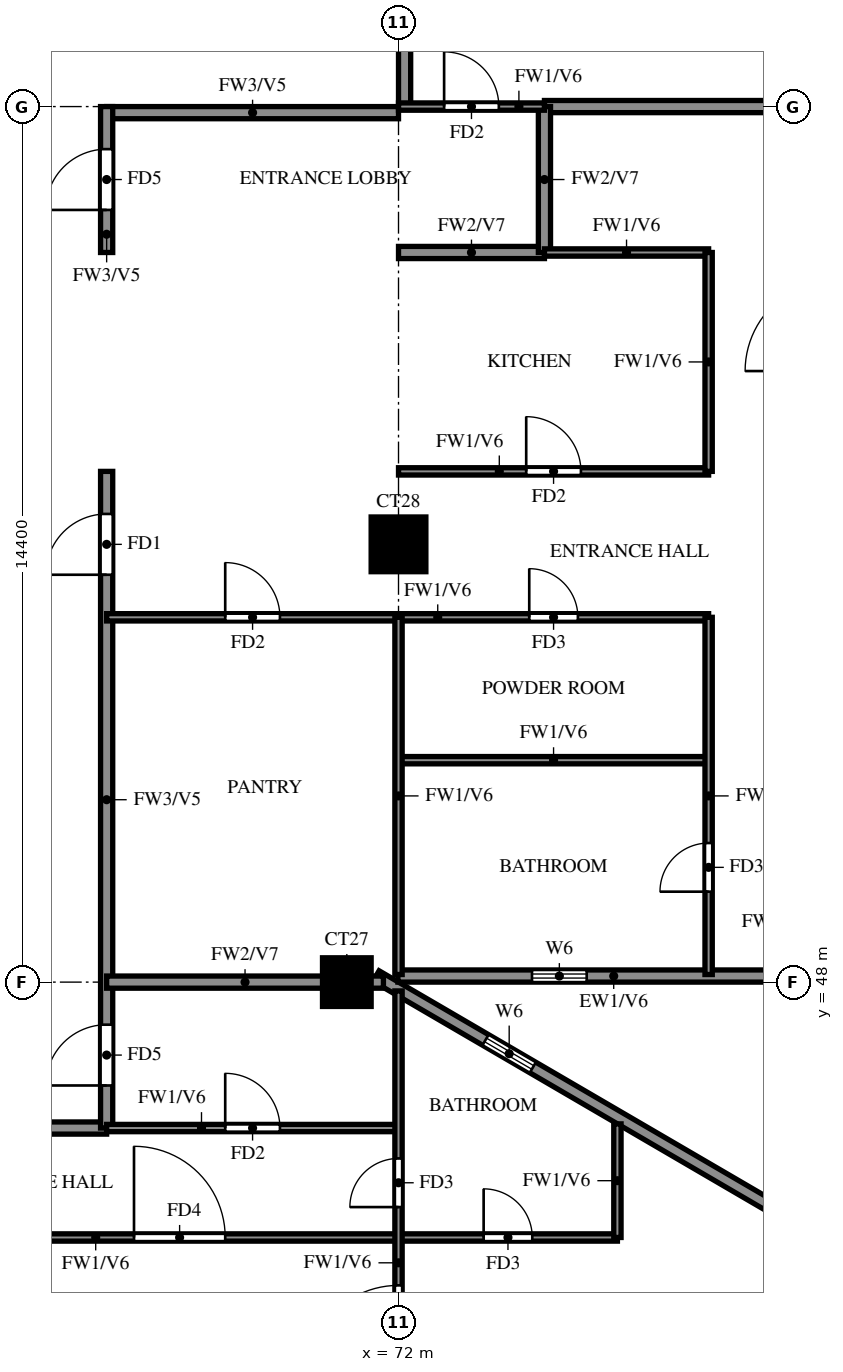
"""IFC4 building model, lengths in metres.
Left out: names, types, materials, properties, quantities, classifications, styles, units other than length and angle.
Written with IfcOpenShell. Run it as: python <this file> out.ifc"""

import sys

from ifc_helpers import new_model, si_unit, direction, frame, frame_2d, origin, origin_2d, place, context, subcontext, project, spatial, rectangle, extrude, source, transform, mapped, element, fill, save


model = new_model("IFC4")
c1 = context("Model", 3, precision=1e-05, world=origin(), true_north=direction((0.0, 1.0)))
c2 = subcontext(c1, "Body", "Model", "MODEL_VIEW")
j1 = project(units=[si_unit("LENGTHUNIT", "METRE"), si_unit("PLANEANGLEUNIT", "RADIAN")], contexts=[c1])
p1 = place(None, origin())
s1 = spatial("IfcSite", under=j1, at=p1, CompositionType="ELEMENT")
p2 = place(p1, origin())
s2 = spatial("IfcBuilding", under=s1, at=p2, CompositionType="ELEMENT")
p3 = place(p2, frame((0.0, 0.0, 202.5)))
s3 = spatial("IfcBuildingStorey", under=s2, at=p3, CompositionType="ELEMENT", Elevation=202.5)
m1 = source(origin(), c2, "Body", "SweptSolid", [
    extrude(rectangle(XDim=0.8, YDim=0.8, at=origin_2d()), origin(), (0.0, 0.0, 1.0), 3.1),
])
p4 = place(p3, frame((71.15, 48.0, 0.0), z_axis=(0.0, 0.0, 1.0), x_axis=(1.0, 0.0, 0.0)))
e1 = element("IfcColumn", 1, at=p4, inside=s3, PredefinedType="COLUMN", context=c2, shape_type="MappedRepresentation", body=[
    mapped(m1, transform((0.0, 0.0, 0.0))),
])
m2 = source(origin(), c2, "Body", "SweptSolid", [
    extrude(rectangle(XDim=0.9, YDim=0.9, at=origin_2d()), origin(), (0.0, 0.0, 1.0), 3.1),
])
p5 = place(p3, frame((72.0, 55.2, 0.0), z_axis=(0.0, 0.0, 1.0), x_axis=(1.0, 0.0, 0.0)))
e2 = element("IfcColumn", 2, at=p5, inside=s3, PredefinedType="COLUMN", context=c2, shape_type="MappedRepresentation", body=[
    mapped(m2, transform((0.0, 0.0, 0.0))),
])
p6 = place(p3, frame((85.719, 39.881, 0.0), z_axis=(0.0, 0.0, 1.0), x_axis=(-0.86377618652, 0.503875678716, 0.0)))
e3 = element("IfcWall", 3, at=p6, inside=s3, PredefinedType="SOLIDWALL", context=c2, shape_type="SweptSolid", body=[
    extrude(rectangle(XDim=16.311, YDim=0.2, at=frame_2d((8.156, 0.0))), origin(), (0.0, 0.0, 1.0), 3.1),
])
p7 = place(p6, frame((13.326, 0.0, 1.5)))
e4 = element("IfcOpeningElement", 4, at=p7, cuts=e3, PredefinedType="OPENING", context=c2, shape_type="SweptSolid", body=[
    extrude(rectangle(XDim=0.9, YDim=0.9, at=frame_2d((0.45, 0.45))), frame((0.0, 0.11, 0.0), z_axis=(0.0, -1.0, 0.0), x_axis=(1.0, 0.0, 0.0)), (0.0, 0.0, 1.0), 0.22),
])
p8 = place(p3, frame((71.99, 48.1, 0.0), z_axis=(0.0, 0.0, 1.0), x_axis=(1.0, 0.0, 0.0)))
e5 = element("IfcWall", 5, at=p8, inside=s3, PredefinedType="SOLIDWALL", context=c2, shape_type="SweptSolid", body=[
    extrude(rectangle(XDim=6.76, YDim=0.2, at=frame_2d((3.38, 0.0))), origin(), (0.0, 0.0, 1.0), 3.1),
])
p9 = place(p8, frame((2.205, 0.0, 1.5)))
e6 = element("IfcOpeningElement", 6, at=p9, cuts=e5, PredefinedType="OPENING", context=c2, shape_type="SweptSolid", body=[
    extrude(rectangle(XDim=0.9, YDim=0.9, at=frame_2d((0.45, 0.45))), frame((0.0, 0.11, 0.0), z_axis=(0.0, -1.0, 0.0), x_axis=(1.0, 0.0, 0.0)), (0.0, 0.0, 1.0), 0.22),
])
p10 = place(p3, frame((60.0, 45.6, 0.0), z_axis=(0.0, 0.0, 1.0), x_axis=(1.0, 0.0, 0.0)))
e7 = element("IfcWall", 7, at=p10, inside=s3, PredefinedType="SOLIDWALL", context=c2, shape_type="SweptSolid", body=[
    extrude(rectangle(XDim=7.2, YDim=0.2, at=frame_2d((3.6, 0.0))), origin(), (0.0, 0.0, 1.0), 3.1),
])
p11 = place(p3, frame((67.2, 62.3, 0.0), z_axis=(0.0, 0.0, 1.0), x_axis=(1.0, 0.0, 0.0)))
e8 = element("IfcWall", 8, at=p11, inside=s3, PredefinedType="SOLIDWALL", context=c2, shape_type="SweptSolid", body=[
    extrude(rectangle(XDim=4.8, YDim=0.2, at=frame_2d((2.4, 0.0))), origin(), (0.0, 0.0, 1.0), 3.1),
])
p12 = place(p3, frame((67.2, 45.6, 0.0), z_axis=(0.0, 0.0, 1.0), x_axis=(0.0, 1.0, 0.0)))
e9 = element("IfcWall", 9, at=p12, inside=s3, PredefinedType="SOLIDWALL", context=c2, shape_type="SweptSolid", body=[
    extrude(rectangle(XDim=10.8, YDim=0.2, at=frame_2d((5.4, 0.0))), origin(), (0.0, 0.0, 1.0), 3.1),
])
p13 = place(p12, frame((9.1, 0.0, 0.0)))
e10 = element("IfcOpeningElement", 10, at=p13, cuts=e9, PredefinedType="OPENING", context=c2, shape_type="SweptSolid", body=[
    extrude(rectangle(XDim=1.0, YDim=2.1, at=frame_2d((0.5, 1.05))), frame((0.0, 0.11, 0.0), z_axis=(0.0, -1.0, 0.0), x_axis=(1.0, 0.0, 0.0)), (0.0, 0.0, 1.0), 0.22),
])
p14 = place(p12, frame((0.7, 0.0, 0.0)))
e11 = element("IfcOpeningElement", 11, at=p14, cuts=e9, PredefinedType="OPENING", context=c2, shape_type="SweptSolid", body=[
    extrude(rectangle(XDim=1.0, YDim=2.1, at=frame_2d((0.5, 1.05))), frame((0.0, 0.11, 0.0), z_axis=(0.0, -1.0, 0.0), x_axis=(1.0, 0.0, 0.0)), (0.0, 0.0, 1.0), 0.22),
])
p15 = place(p3, frame((67.2, 60.0, 0.0), z_axis=(0.0, 0.0, 1.0), x_axis=(0.0, 1.0, 0.0)))
e12 = element("IfcWall", 12, at=p15, inside=s3, PredefinedType="SOLIDWALL", context=c2, shape_type="SweptSolid", body=[
    extrude(rectangle(XDim=2.4, YDim=0.2, at=frame_2d((1.2, 0.0))), origin(), (0.0, 0.0, 1.0), 3.1),
])
p16 = place(p15, frame((0.7, 0.0, 0.0)))
e13 = element("IfcOpeningElement", 13, at=p16, cuts=e12, PredefinedType="OPENING", context=c2, shape_type="SweptSolid", body=[
    extrude(rectangle(XDim=1.0, YDim=2.1, at=frame_2d((0.5, 1.05))), frame((0.0, 0.11, 0.0), z_axis=(0.0, -1.0, 0.0), x_axis=(1.0, 0.0, 0.0)), (0.0, 0.0, 1.0), 0.22),
])
p17 = place(p3, frame((72.1, 62.4, 0.0), z_axis=(0.0, 0.0, 1.0), x_axis=(0.0, 1.0, 0.0)))
e14 = element("IfcWall", 14, at=p17, inside=s3, PredefinedType="SOLIDWALL", context=c2, shape_type="SweptSolid", body=[
    extrude(rectangle(XDim=15.6, YDim=0.2, at=frame_2d((7.8, 0.0))), origin(), (0.0, 0.0, 1.0), 3.1),
])
p18 = place(p3, frame((67.2, 48.0, 0.0), z_axis=(0.0, 0.0, 1.0), x_axis=(1.0, 0.0, 0.0)))
e15 = element("IfcWall", 15, at=p18, inside=s3, PredefinedType="SOLIDWALL", context=c2, shape_type="SweptSolid", body=[
    extrude(rectangle(XDim=4.552, YDim=0.2, at=frame_2d((2.276, 0.0))), origin(), (0.0, 0.0, 1.0), 3.1),
])
p19 = place(p3, frame((72.0, 60.0, 0.0), z_axis=(0.0, 0.0, 1.0), x_axis=(1.0, 0.0, 0.0)))
e16 = element("IfcWall", 16, at=p19, inside=s3, PredefinedType="SOLIDWALL", context=c2, shape_type="SweptSolid", body=[
    extrude(rectangle(XDim=2.4, YDim=0.2, at=frame_2d((1.2, 0.0))), origin(), (0.0, 0.0, 1.0), 3.1),
])
p20 = place(p3, frame((74.4, 62.4, 0.0), z_axis=(0.0, 0.0, 1.0), x_axis=(1.0, 0.0, 0.0)))
e17 = element("IfcWall", 17, at=p20, inside=s3, PredefinedType="SOLIDWALL", context=c2, shape_type="SweptSolid", body=[
    extrude(rectangle(XDim=11.875, YDim=0.2, at=frame_2d((5.938, 0.0))), origin(), (0.0, 0.0, 1.0), 3.1),
])
p21 = place(p3, frame((74.4, 60.0, 0.0), z_axis=(0.0, 0.0, 1.0), x_axis=(0.0, 1.0, 0.0)))
e18 = element("IfcWall", 18, at=p21, inside=s3, PredefinedType="SOLIDWALL", context=c2, shape_type="SweptSolid", body=[
    extrude(rectangle(XDim=2.4, YDim=0.2, at=frame_2d((1.2, 0.0))), origin(), (0.0, 0.0, 1.0), 3.1),
])
p22 = place(p3, frame((60.0, 43.8, 0.0), z_axis=(0.0, 0.0, 1.0), x_axis=(1.0, 0.0, 0.0)))
e19 = element("IfcWall", 19, at=p22, inside=s3, PredefinedType="PARTITIONING", context=c2, shape_type="SweptSolid", body=[
    extrude(rectangle(XDim=15.6, YDim=0.12, at=frame_2d((7.8, 0.0))), origin(), (0.0, 0.0, 1.0), 3.1),
])
p23 = place(p22, frame((7.65, 0.0, 0.0)))
e20 = element("IfcOpeningElement", 20, at=p23, cuts=e19, PredefinedType="OPENING", context=c2, shape_type="SweptSolid", body=[
    extrude(rectangle(XDim=1.5, YDim=2.1, at=frame_2d((0.75, 1.05))), frame((0.0, 0.07, 0.0), z_axis=(0.0, -1.0, 0.0), x_axis=(1.0, 0.0, 0.0)), (0.0, 0.0, 1.0), 0.14),
])
p24 = place(p22, frame((1.95, 0.0, 0.0)))
e21 = element("IfcOpeningElement", 21, at=p24, cuts=e19, PredefinedType="OPENING", context=c2, shape_type="SweptSolid", body=[
    extrude(rectangle(XDim=0.9, YDim=2.1, at=frame_2d((0.45, 1.05))), frame((0.0, 0.07, 0.0), z_axis=(0.0, -1.0, 0.0), x_axis=(1.0, 0.0, 0.0)), (0.0, 0.0, 1.0), 0.14),
])
p25 = place(p22, frame((13.4, 0.0, 0.0)))
e22 = element("IfcOpeningElement", 22, at=p25, cuts=e19, PredefinedType="OPENING", context=c2, shape_type="SweptSolid", body=[
    extrude(rectangle(XDim=0.8, YDim=2.1, at=frame_2d((0.4, 1.05))), frame((0.0, 0.07, 0.0), z_axis=(0.0, -1.0, 0.0), x_axis=(1.0, 0.0, 0.0)), (0.0, 0.0, 1.0), 0.14),
])
p26 = place(p3, frame((67.2, 45.6, 0.0), z_axis=(0.0, 0.0, 1.0), x_axis=(1.0, 0.0, 0.0)))
e23 = element("IfcWall", 23, at=p26, inside=s3, PredefinedType="PARTITIONING", context=c2, shape_type="SweptSolid", body=[
    extrude(rectangle(XDim=4.8, YDim=0.12, at=frame_2d((2.4, 0.0))), origin(), (0.0, 0.0, 1.0), 3.1),
])
p27 = place(p26, frame((1.95, 0.0, 0.0)))
e24 = element("IfcOpeningElement", 24, at=p27, cuts=e23, PredefinedType="OPENING", context=c2, shape_type="SweptSolid", body=[
    extrude(rectangle(XDim=0.9, YDim=2.1, at=frame_2d((0.45, 1.05))), frame((0.0, 0.07, 0.0), z_axis=(0.0, -1.0, 0.0), x_axis=(1.0, 0.0, 0.0)), (0.0, 0.0, 1.0), 0.14),
])
p28 = place(p3, frame((72.0, 51.65, 0.0), z_axis=(0.0, 0.0, 1.0), x_axis=(1.0, 0.0, 0.0)))
e25 = element("IfcWall", 25, at=p28, inside=s3, PredefinedType="PARTITIONING", context=c2, shape_type="SweptSolid", body=[
    extrude(rectangle(XDim=5.1, YDim=0.12, at=frame_2d((2.55, 0.0))), origin(), (0.0, 0.0, 1.0), 3.1),
])
p29 = place(p3, frame((67.2, 54.0, 0.0), z_axis=(0.0, 0.0, 1.0), x_axis=(1.0, 0.0, 0.0)))
e26 = element("IfcWall", 26, at=p29, inside=s3, PredefinedType="PARTITIONING", context=c2, shape_type="SweptSolid", body=[
    extrude(rectangle(XDim=9.9, YDim=0.12, at=frame_2d((4.95, 0.0))), origin(), (0.0, 0.0, 1.0), 3.1),
])
p30 = place(p29, frame((6.95, 0.0, 0.0)))
e27 = element("IfcOpeningElement", 27, at=p30, cuts=e26, PredefinedType="OPENING", context=c2, shape_type="SweptSolid", body=[
    extrude(rectangle(XDim=0.8, YDim=2.1, at=frame_2d((0.4, 1.05))), frame((0.0, 0.07, 0.0), z_axis=(0.0, -1.0, 0.0), x_axis=(1.0, 0.0, 0.0)), (0.0, 0.0, 1.0), 0.14),
])
p31 = place(p29, frame((1.95, 0.0, 0.0)))
e28 = element("IfcOpeningElement", 28, at=p31, cuts=e26, PredefinedType="OPENING", context=c2, shape_type="SweptSolid", body=[
    extrude(rectangle(XDim=0.9, YDim=2.1, at=frame_2d((0.45, 1.05))), frame((0.0, 0.07, 0.0), z_axis=(0.0, -1.0, 0.0), x_axis=(1.0, 0.0, 0.0)), (0.0, 0.0, 1.0), 0.14),
])
p32 = place(p3, frame((72.0, 56.4, 0.0), z_axis=(0.0, 0.0, 1.0), x_axis=(1.0, 0.0, 0.0)))
e29 = element("IfcWall", 29, at=p32, inside=s3, PredefinedType="PARTITIONING", context=c2, shape_type="SweptSolid", body=[
    extrude(rectangle(XDim=5.1, YDim=0.12, at=frame_2d((2.55, 0.0))), origin(), (0.0, 0.0, 1.0), 3.1),
])
p33 = place(p32, frame((2.1, 0.0, 0.0)))
e30 = element("IfcOpeningElement", 30, at=p33, cuts=e29, PredefinedType="OPENING", context=c2, shape_type="SweptSolid", body=[
    extrude(rectangle(XDim=0.9, YDim=2.1, at=frame_2d((0.45, 1.05))), frame((0.0, 0.07, 0.0), z_axis=(0.0, -1.0, 0.0), x_axis=(1.0, 0.0, 0.0)), (0.0, 0.0, 1.0), 0.14),
])
p34 = place(p3, frame((74.4, 60.0, 0.0), z_axis=(0.0, 0.0, 1.0), x_axis=(1.0, 0.0, 0.0)))
e31 = element("IfcWall", 31, at=p34, inside=s3, PredefinedType="PARTITIONING", context=c2, shape_type="SweptSolid", body=[
    extrude(rectangle(XDim=2.7, YDim=0.12, at=frame_2d((1.35, 0.0))), origin(), (0.0, 0.0, 1.0), 3.1),
])
p35 = place(p3, frame((72.0, 62.4, 0.0), z_axis=(0.0, 0.0, 1.0), x_axis=(1.0, 0.0, 0.0)))
e32 = element("IfcWall", 32, at=p35, inside=s3, PredefinedType="PARTITIONING", context=c2, shape_type="SweptSolid", body=[
    extrude(rectangle(XDim=2.4, YDim=0.12, at=frame_2d((1.2, 0.0))), origin(), (0.0, 0.0, 1.0), 3.1),
])
p36 = place(p35, frame((0.75, 0.0, 0.0)))
e33 = element("IfcOpeningElement", 33, at=p36, cuts=e32, PredefinedType="OPENING", context=c2, shape_type="SweptSolid", body=[
    extrude(rectangle(XDim=0.9, YDim=2.1, at=frame_2d((0.45, 1.05))), frame((0.0, 0.07, 0.0), z_axis=(0.0, -1.0, 0.0), x_axis=(1.0, 0.0, 0.0)), (0.0, 0.0, 1.0), 0.14),
])
p37 = place(p3, frame((72.0, 39.725, 0.0), z_axis=(0.0, 0.0, 1.0), x_axis=(0.0, 1.0, 0.0)))
e34 = element("IfcWall", 34, at=p37, inside=s3, PredefinedType="PARTITIONING", context=c2, shape_type="SweptSolid", body=[
    extrude(rectangle(XDim=8.13, YDim=0.12, at=frame_2d((4.065, 0.0))), origin(), (0.0, 0.0, 1.0), 3.1),
])
p38 = place(p37, frame((1.788, 0.0, 0.0)))
e35 = element("IfcOpeningElement", 35, at=p38, cuts=e34, PredefinedType="OPENING", context=c2, shape_type="SweptSolid", body=[
    extrude(rectangle(XDim=1.5, YDim=2.1, at=frame_2d((0.75, 1.05))), frame((0.0, 0.07, 0.0), z_axis=(0.0, -1.0, 0.0), x_axis=(1.0, 0.0, 0.0)), (0.0, 0.0, 1.0), 0.14),
])
p39 = place(p37, frame((4.575, 0.0, 0.0)))
e36 = element("IfcOpeningElement", 36, at=p39, cuts=e34, PredefinedType="OPENING", context=c2, shape_type="SweptSolid", body=[
    extrude(rectangle(XDim=0.8, YDim=2.1, at=frame_2d((0.4, 1.05))), frame((0.0, 0.07, 0.0), z_axis=(0.0, -1.0, 0.0), x_axis=(1.0, 0.0, 0.0)), (0.0, 0.0, 1.0), 0.14),
])
p40 = place(p3, frame((72.0, 48.125, 0.0), z_axis=(0.0, 0.0, 1.0), x_axis=(0.0, 1.0, 0.0)))
e37 = element("IfcWall", 37, at=p40, inside=s3, PredefinedType="PARTITIONING", context=c2, shape_type="SweptSolid", body=[
    extrude(rectangle(XDim=5.875, YDim=0.12, at=frame_2d((2.938, 0.0))), origin(), (0.0, 0.0, 1.0), 3.1),
])
p41 = place(p3, frame((75.6, 43.8, 0.0), z_axis=(0.0, 0.0, 1.0), x_axis=(0.0, 1.0, 0.0)))
e38 = element("IfcWall", 38, at=p41, inside=s3, PredefinedType="PARTITIONING", context=c2, shape_type="SweptSolid", body=[
    extrude(rectangle(XDim=1.868, YDim=0.12, at=frame_2d((0.934, 0.0))), origin(), (0.0, 0.0, 1.0), 3.1),
])
p42 = place(p3, frame((77.1, 48.125, 0.0), z_axis=(0.0, 0.0, 1.0), x_axis=(0.0, 1.0, 0.0)))
e39 = element("IfcWall", 39, at=p42, inside=s3, PredefinedType="PARTITIONING", context=c2, shape_type="SweptSolid", body=[
    extrude(rectangle(XDim=5.875, YDim=0.12, at=frame_2d((2.938, 0.0))), origin(), (0.0, 0.0, 1.0), 3.1),
])
p43 = place(p42, frame((1.363, 0.0, 0.0)))
e40 = element("IfcOpeningElement", 40, at=p43, cuts=e39, PredefinedType="OPENING", context=c2, shape_type="SweptSolid", body=[
    extrude(rectangle(XDim=0.8, YDim=2.1, at=frame_2d((0.4, 1.05))), frame((0.0, 0.07, 0.0), z_axis=(0.0, -1.0, 0.0), x_axis=(1.0, 0.0, 0.0)), (0.0, 0.0, 1.0), 0.14),
])
p44 = place(p3, frame((77.1, 56.4, 0.0), z_axis=(0.0, 0.0, 1.0), x_axis=(0.0, 1.0, 0.0)))
e41 = element("IfcWall", 41, at=p44, inside=s3, PredefinedType="PARTITIONING", context=c2, shape_type="SweptSolid", body=[
    extrude(rectangle(XDim=3.6, YDim=0.12, at=frame_2d((1.8, 0.0))), origin(), (0.0, 0.0, 1.0), 3.1),
])
p45 = place(p7, origin())
e42 = element("IfcWindow", 42, at=p45, inside=s3, PartitioningType="SINGLE_PANEL", PredefinedType="WINDOW", context=c2, shape_type="SweptSolid", body=[
    extrude(rectangle(XDim=0.9, YDim=0.9, at=frame_2d((0.45, 0.45))), frame((0.0, 0.03, 0.0), z_axis=(0.0, -1.0, 0.0), x_axis=(1.0, 0.0, 0.0)), (0.0, 0.0, 1.0), 0.06),
])
fill(e4, e42)
p46 = place(p9, origin())
e43 = element("IfcWindow", 43, at=p46, inside=s3, PartitioningType="SINGLE_PANEL", PredefinedType="WINDOW", context=c2, shape_type="SweptSolid", body=[
    extrude(rectangle(XDim=0.9, YDim=0.9, at=frame_2d((0.45, 0.45))), frame((0.0, 0.03, 0.0), z_axis=(0.0, -1.0, 0.0), x_axis=(1.0, 0.0, 0.0)), (0.0, 0.0, 1.0), 0.06),
])
fill(e6, e43)
p47 = place(p13, origin())
e44 = element("IfcDoor", 44, at=p47, inside=s3, OperationType="SINGLE_SWING_RIGHT", PredefinedType="DOOR", context=c2, shape_type="SweptSolid", body=[
    extrude(rectangle(XDim=1.0, YDim=2.1, at=frame_2d((0.5, 1.05))), frame((0.0, 0.025, 0.0), z_axis=(0.0, -1.0, 0.0), x_axis=(1.0, 0.0, 0.0)), (0.0, 0.0, 1.0), 0.05),
])
fill(e10, e44)
p48 = place(p43, origin())
e45 = element("IfcDoor", 45, at=p48, inside=s3, OperationType="SINGLE_SWING_LEFT", PredefinedType="DOOR", context=c2, shape_type="SweptSolid", body=[
    extrude(rectangle(XDim=0.8, YDim=2.1, at=frame_2d((0.4, 1.05))), frame((0.0, 0.025, 0.0), z_axis=(0.0, -1.0, 0.0), x_axis=(1.0, 0.0, 0.0)), (0.0, 0.0, 1.0), 0.05),
])
fill(e40, e45)
p49 = place(p30, origin())
e46 = element("IfcDoor", 46, at=p49, inside=s3, OperationType="SINGLE_SWING_LEFT", PredefinedType="DOOR", context=c2, shape_type="SweptSolid", body=[
    extrude(rectangle(XDim=0.8, YDim=2.1, at=frame_2d((0.4, 1.05))), frame((0.0, 0.025, 0.0), z_axis=(0.0, -1.0, 0.0), x_axis=(1.0, 0.0, 0.0)), (0.0, 0.0, 1.0), 0.05),
])
fill(e27, e46)
p50 = place(p33, origin())
e47 = element("IfcDoor", 47, at=p50, inside=s3, OperationType="SINGLE_SWING_RIGHT", PredefinedType="DOOR", context=c2, shape_type="SweptSolid", body=[
    extrude(rectangle(XDim=0.9, YDim=2.1, at=frame_2d((0.45, 1.05))), frame((0.0, 0.025, 0.0), z_axis=(0.0, -1.0, 0.0), x_axis=(1.0, 0.0, 0.0)), (0.0, 0.0, 1.0), 0.05),
])
fill(e30, e47)
p51 = place(p31, origin())
e48 = element("IfcDoor", 48, at=p51, inside=s3, OperationType="SINGLE_SWING_LEFT", PredefinedType="DOOR", context=c2, shape_type="SweptSolid", body=[
    extrude(rectangle(XDim=0.9, YDim=2.1, at=frame_2d((0.45, 1.05))), frame((0.0, 0.025, 0.0), z_axis=(0.0, -1.0, 0.0), x_axis=(1.0, 0.0, 0.0)), (0.0, 0.0, 1.0), 0.05),
])
fill(e28, e48)
p52 = place(p36, origin())
e49 = element("IfcDoor", 49, at=p52, inside=s3, OperationType="SINGLE_SWING_LEFT", PredefinedType="DOOR", context=c2, shape_type="SweptSolid", body=[
    extrude(rectangle(XDim=0.9, YDim=2.1, at=frame_2d((0.45, 1.05))), frame((0.0, 0.025, 0.0), z_axis=(0.0, -1.0, 0.0), x_axis=(1.0, 0.0, 0.0)), (0.0, 0.0, 1.0), 0.05),
])
fill(e33, e49)
p53 = place(p16, origin())
e50 = element("IfcDoor", 50, at=p53, inside=s3, OperationType="SINGLE_SWING_LEFT", PredefinedType="DOOR", context=c2, shape_type="SweptSolid", body=[
    extrude(rectangle(XDim=1.0, YDim=2.1, at=frame_2d((0.5, 1.05))), frame((0.0, 0.025, 0.0), z_axis=(0.0, -1.0, 0.0), x_axis=(1.0, 0.0, 0.0)), (0.0, 0.0, 1.0), 0.05),
])
fill(e13, e50)
p54 = place(p27, origin())
e51 = element("IfcDoor", 51, at=p54, inside=s3, OperationType="SINGLE_SWING_LEFT", PredefinedType="DOOR", context=c2, shape_type="SweptSolid", body=[
    extrude(rectangle(XDim=0.9, YDim=2.1, at=frame_2d((0.45, 1.05))), frame((0.0, 0.025, 0.0), z_axis=(0.0, -1.0, 0.0), x_axis=(1.0, 0.0, 0.0)), (0.0, 0.0, 1.0), 0.05),
])
fill(e24, e51)
p55 = place(p14, origin())
e52 = element("IfcDoor", 52, at=p55, inside=s3, OperationType="SINGLE_SWING_LEFT", PredefinedType="DOOR", context=c2, shape_type="SweptSolid", body=[
    extrude(rectangle(XDim=1.0, YDim=2.1, at=frame_2d((0.5, 1.05))), frame((0.0, 0.025, 0.0), z_axis=(0.0, -1.0, 0.0), x_axis=(1.0, 0.0, 0.0)), (0.0, 0.0, 1.0), 0.05),
])
fill(e11, e52)
p56 = place(p23, origin())
e53 = element("IfcDoor", 53, at=p56, inside=s3, OperationType="SINGLE_SWING_RIGHT", PredefinedType="DOOR", context=c2, shape_type="SweptSolid", body=[
    extrude(rectangle(XDim=1.5, YDim=2.1, at=frame_2d((0.75, 1.05))), frame((0.0, 0.025, 0.0), z_axis=(0.0, -1.0, 0.0), x_axis=(1.0, 0.0, 0.0)), (0.0, 0.0, 1.0), 0.05),
])
fill(e20, e53)
p57 = place(p38, origin())
e54 = element("IfcDoor", 54, at=p57, inside=s3, OperationType="SINGLE_SWING_RIGHT", PredefinedType="DOOR", context=c2, shape_type="SweptSolid", body=[
    extrude(rectangle(XDim=1.5, YDim=2.1, at=frame_2d((0.75, 1.05))), frame((0.0, 0.025, 0.0), z_axis=(0.0, -1.0, 0.0), x_axis=(1.0, 0.0, 0.0)), (0.0, 0.0, 1.0), 0.05),
])
fill(e35, e54)
p58 = place(p39, origin())
e55 = element("IfcDoor", 55, at=p58, inside=s3, OperationType="SINGLE_SWING_RIGHT", PredefinedType="DOOR", context=c2, shape_type="SweptSolid", body=[
    extrude(rectangle(XDim=0.8, YDim=2.1, at=frame_2d((0.4, 1.05))), frame((0.0, 0.025, 0.0), z_axis=(0.0, -1.0, 0.0), x_axis=(1.0, 0.0, 0.0)), (0.0, 0.0, 1.0), 0.05),
])
fill(e36, e55)
p59 = place(p25, origin())
e56 = element("IfcDoor", 56, at=p59, inside=s3, OperationType="SINGLE_SWING_LEFT", PredefinedType="DOOR", context=c2, shape_type="SweptSolid", body=[
    extrude(rectangle(XDim=0.8, YDim=2.1, at=frame_2d((0.4, 1.05))), frame((0.0, 0.025, 0.0), z_axis=(0.0, -1.0, 0.0), x_axis=(1.0, 0.0, 0.0)), (0.0, 0.0, 1.0), 0.05),
])
fill(e22, e56)
save(model, sys.argv[1])
